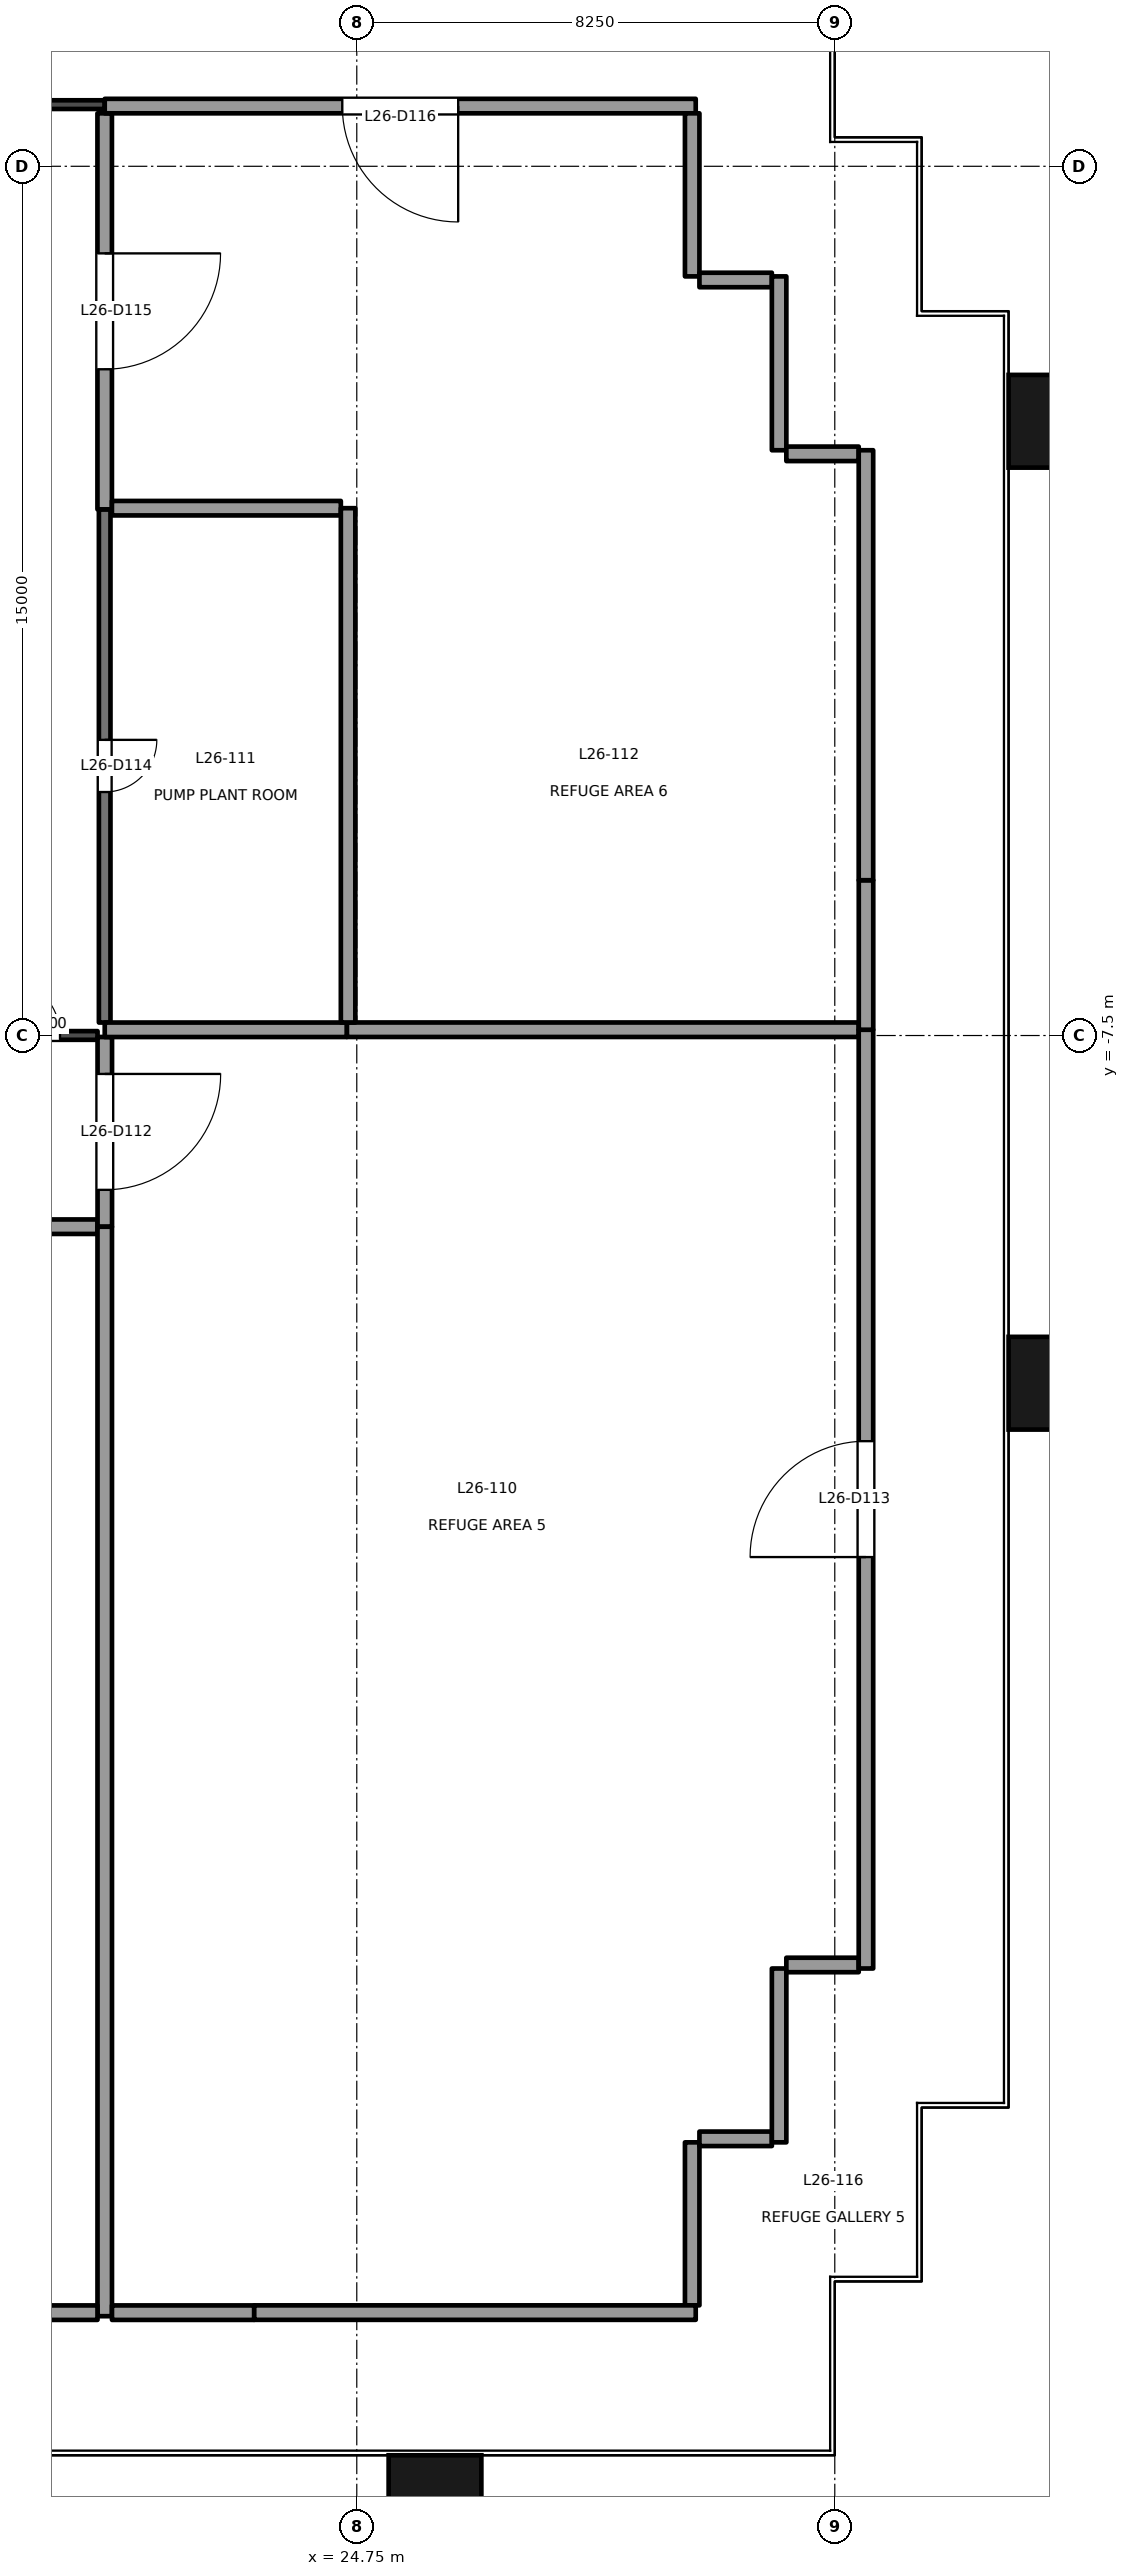
"""IFC4 building model, lengths in metres.
Left out: names, types, materials, properties, quantities, classifications, styles, units other than length and angle.
Written with IfcOpenShell. Run it as: python <this file> out.ifc"""

import sys

from ifc_helpers import new_model, si_unit, direction, frame, frame_2d, origin, origin_2d, place, context, subcontext, project, spatial, rectangle, extrude, element, fill, save


model = new_model("IFC4")
c1 = context("Model", 3, precision=1e-05, world=origin(), true_north=direction((0.0, 1.0)))
c2 = subcontext(c1, "Body", "Model", "MODEL_VIEW")
j1 = project(units=[si_unit("LENGTHUNIT", "METRE"), si_unit("PLANEANGLEUNIT", "RADIAN")], contexts=[c1])
p1 = place(None, origin())
s1 = spatial("IfcSite", under=j1, at=p1, CompositionType="ELEMENT")
p2 = place(p1, origin())
s2 = spatial("IfcBuilding", under=s1, at=p2, CompositionType="ELEMENT")
p3 = place(p2, frame((0.0, 0.0, 115.7)))
s3 = spatial("IfcBuildingStorey", under=s2, at=p3, CompositionType="ELEMENT", Elevation=115.7)
for number, where, z_axis, x_axis in (
    (1, (26.1, -32.9, -0.2), (0.0, 0.0, 1.0), (1.0, 0.0, 0.0)),
    (2, (36.9, -13.5, -0.2), (0.0, 0.0, 1.0), (0.0, 1.0, 0.0)),
    (3, (36.9, 3.1, -0.2), (0.0, 0.0, 1.0), (0.0, 1.0, 0.0)),
):
    element("IfcColumn", number, at=place(p3, frame(where, z_axis=z_axis, x_axis=x_axis)), inside=s3, PredefinedType="COLUMN", context=c2, shape_type="SweptSolid", body=[
        extrude(rectangle(XDim=1.6, YDim=1.8, at=origin_2d()), origin(), (0.0, 0.0, 1.0), 5.0),
    ])
p4 = place(p3, frame((17.98, -7.499, 0.0), z_axis=(0.0, 0.0, 1.0), x_axis=(1.0, 0.0, 0.0)))
e4 = element("IfcWall", 4, at=p4, inside=s3, PredefinedType="PARTITIONING", context=c2, shape_type="SweptSolid", body=[
    extrude(rectangle(XDim=2.296, YDim=0.15, at=frame_2d((1.148, 0.0))), origin(), (0.0, 0.0, 1.0), 2.35),
])
p5 = place(p4, frame((0.648, 0.0, 0.0)))
e5 = element("IfcOpeningElement", 5, at=p5, cuts=e4, PredefinedType="OPENING", context=c2, shape_type="SweptSolid", body=[
    extrude(rectangle(XDim=1.0, YDim=2.1, at=frame_2d((0.5, 1.05))), frame((0.0, 0.085, 0.0), z_axis=(0.0, -1.0, 0.0), x_axis=(1.0, 0.0, 0.0)), (0.0, 0.0, 1.0), 0.171),
])
p6 = place(p3, frame((20.275, -10.799, 0.0), z_axis=(0.0, 0.0, 1.0), x_axis=(-1.0, 0.0, 0.0)))
e6 = element("IfcWall", 6, at=p6, inside=s3, PredefinedType="PARTITIONING", context=c2, shape_type="SweptSolid", body=[
    extrude(rectangle(XDim=4.883, YDim=0.25, at=frame_2d((2.441, 0.0))), origin(), (0.0, 0.0, 1.0), 2.35),
])
p7 = place(p6, frame((1.441, 0.0, 0.0)))
e7 = element("IfcOpeningElement", 7, at=p7, cuts=e6, PredefinedType="OPENING", context=c2, shape_type="SweptSolid", body=[
    extrude(rectangle(XDim=2.0, YDim=2.1, at=frame_2d((1.0, 1.05))), frame((0.0, 0.135, 0.0), z_axis=(0.0, -1.0, 0.0), x_axis=(1.0, 0.0, 0.0)), (0.0, 0.0, 1.0), 0.271),
])
p8 = place(p3, frame((20.401, -7.526, 0.0), z_axis=(0.0, 0.0, 1.0), x_axis=(0.0, -1.0, 0.0)))
e8 = element("IfcWall", 8, at=p8, inside=s3, PredefinedType="PARTITIONING", context=c2, shape_type="SweptSolid", body=[
    extrude(rectangle(XDim=3.274, YDim=0.25, at=frame_2d((1.637, 0.0))), origin(), (0.0, 0.0, 1.0), 4.3),
])
p9 = place(p8, frame((0.637, 0.0, 0.0)))
e9 = element("IfcOpeningElement", 9, at=p9, cuts=e8, PredefinedType="OPENING", context=c2, shape_type="SweptSolid", body=[
    extrude(rectangle(XDim=2.0, YDim=2.1, at=frame_2d((1.0, 1.05))), frame((0.0, 0.135, 0.0), z_axis=(0.0, -1.0, 0.0), x_axis=(1.0, 0.0, 0.0)), (0.0, 0.0, 1.0), 0.271),
])
p10 = place(p3, frame((20.399, 1.58, 0.0), z_axis=(0.0, 0.0, 1.0), x_axis=(0.0, -1.0, 0.0)))
e10 = element("IfcWall", 10, at=p10, inside=s3, PredefinedType="PARTITIONING", context=c2, shape_type="SweptSolid", body=[
    extrude(rectangle(XDim=8.856, YDim=0.2, at=frame_2d((4.428, 0.0))), origin(), (0.0, 0.0, 1.0), 4.3),
])
p11 = place(p10, frame((3.978, 0.0, 0.0)))
e11 = element("IfcOpeningElement", 11, at=p11, cuts=e10, PredefinedType="OPENING", context=c2, shape_type="SweptSolid", body=[
    extrude(rectangle(XDim=0.9, YDim=2.1, at=frame_2d((0.45, 1.05))), frame((0.0, 0.111, 0.0), z_axis=(0.0, -1.0, 0.0), x_axis=(1.0, 0.0, 0.0)), (0.0, 0.0, 1.0), 0.221),
])
p12 = place(p3, frame((20.399, 8.414, 0.0), z_axis=(0.0, 0.0, 1.0), x_axis=(0.0, -1.0, 0.0)))
e12 = element("IfcWall", 12, at=p12, inside=s3, PredefinedType="PARTITIONING", context=c2, shape_type="SweptSolid", body=[
    extrude(rectangle(XDim=6.834, YDim=0.25, at=frame_2d((3.417, 0.0))), origin(), (0.0, 0.0, 1.0), 2.75),
])
p13 = place(p12, frame((2.417, 0.0, 0.0)))
e13 = element("IfcOpeningElement", 13, at=p13, cuts=e12, PredefinedType="OPENING", context=c2, shape_type="SweptSolid", body=[
    extrude(rectangle(XDim=2.0, YDim=2.1, at=frame_2d((1.0, 1.05))), frame((0.0, 0.135, 0.0), z_axis=(0.0, -1.0, 0.0), x_axis=(1.0, 0.0, 0.0)), (0.0, 0.0, 1.0), 0.271),
])
p14 = place(p3, frame((-20.3, 8.564, 0.0), z_axis=(0.0, 0.0, 1.0), x_axis=(1.0, 0.0, 0.0)))
e14 = element("IfcWall", 14, at=p14, inside=s3, PredefinedType="PARTITIONING", context=c2, shape_type="SweptSolid", body=[
    extrude(rectangle(XDim=40.7, YDim=0.15, at=frame_2d((20.35, 0.0))), origin(), (0.0, 0.0, 1.0), 2.75),
])
p15 = place(p3, frame((20.4, -10.8, 0.0), z_axis=(0.0, 0.0, 1.0), x_axis=(0.0, -1.0, 0.0)))
e15 = element("IfcWall", 15, at=p15, inside=s3, PredefinedType="PARTITIONING", context=c2, shape_type="SweptSolid", body=[
    extrude(rectangle(XDim=18.8, YDim=0.25, at=frame_2d((9.4, 0.0))), origin(), (0.0, 0.0, 1.0), 2.75),
])
p16 = place(p3, frame((9.537, -29.539, 0.0), z_axis=(0.0, 0.0, 1.0), x_axis=(1.0, 0.0, 0.0)))
e16 = element("IfcWall", 16, at=p16, inside=s3, PredefinedType="PARTITIONING", context=c2, shape_type="SweptSolid", body=[
    extrude(rectangle(XDim=10.738, YDim=0.25, at=frame_2d((5.369, 0.0))), origin(), (0.0, 0.0, 1.0), 2.35),
])
p17 = place(p16, frame((4.369, 0.0, 0.0)))
e17 = element("IfcOpeningElement", 17, at=p17, cuts=e16, PredefinedType="OPENING", context=c2, shape_type="SweptSolid", body=[
    extrude(rectangle(XDim=2.0, YDim=2.1, at=frame_2d((1.0, 1.05))), frame((0.0, 0.135, 0.0), z_axis=(0.0, -1.0, 0.0), x_axis=(1.0, 0.0, 0.0)), (0.0, 0.0, 1.0), 0.271),
])
p18 = place(p3, frame((20.4, -7.401, 0.0), z_axis=(0.0, 0.0, 1.0), x_axis=(1.0, 0.0, 0.0)))
e18 = element("IfcWall", 18, at=p18, inside=s3, PredefinedType="PARTITIONING", context=c2, shape_type="SweptSolid", body=[
    extrude(rectangle(XDim=4.18, YDim=0.25, at=frame_2d((2.09, 0.0))), origin(), (0.0, 0.0, 1.0), 4.8),
])
p19 = place(p3, frame((24.58, -7.4, 0.0), z_axis=(0.0, 0.0, 1.0), x_axis=(1.0, 0.0, 0.0)))
e19 = element("IfcWall", 19, at=p19, inside=s3, PredefinedType="PARTITIONING", context=c2, shape_type="SweptSolid", body=[
    extrude(rectangle(XDim=8.833, YDim=0.25, at=frame_2d((4.417, 0.0))), origin(), (0.0, 0.0, 1.0), 3.7),
])
p20 = place(p3, frame((22.98, -29.539, 0.0), z_axis=(0.0, 0.0, 1.0), x_axis=(-1.0, 0.0, 0.0)))
e20 = element("IfcWall", 20, at=p20, inside=s3, PredefinedType="PARTITIONING", context=c2, shape_type="SweptSolid", body=[
    extrude(rectangle(XDim=2.455, YDim=0.25, at=frame_2d((1.228, 0.0))), origin(), (0.0, 0.0, 1.0), 4.8),
])
p21 = place(p3, frame((30.539, -26.6, 0.0), z_axis=(0.0, 0.0, 1.0), x_axis=(0.0, -1.0, 0.0)))
e21 = element("IfcWall", 21, at=p21, inside=s3, PredefinedType="PARTITIONING", context=c2, shape_type="SweptSolid", body=[
    extrude(rectangle(XDim=2.813, YDim=0.25, at=frame_2d((1.406, 0.0))), origin(), (0.0, 0.0, 1.0), 4.8),
])
p22 = place(p3, frame((30.6, -29.538, 0.0), z_axis=(0.0, 0.0, 1.0), x_axis=(-1.0, 0.0, 0.0)))
e22 = element("IfcWall", 22, at=p22, inside=s3, PredefinedType="PARTITIONING", context=c2, shape_type="SweptSolid", body=[
    extrude(rectangle(XDim=7.62, YDim=0.25, at=frame_2d((3.81, 0.0))), origin(), (0.0, 0.0, 1.0), 4.8),
])
p23 = place(p3, frame((31.914, -26.539, 0.0), z_axis=(0.0, 0.0, 1.0), x_axis=(-1.0, 0.0, 0.0)))
e23 = element("IfcWall", 23, at=p23, inside=s3, PredefinedType="PARTITIONING", context=c2, shape_type="SweptSolid", body=[
    extrude(rectangle(XDim=1.25, YDim=0.25, at=frame_2d((0.625, 0.0))), origin(), (0.0, 0.0, 1.0), 4.8),
])
p24 = place(p3, frame((32.039, -23.6, 0.0), z_axis=(0.0, 0.0, 1.0), x_axis=(0.0, -1.0, 0.0)))
e24 = element("IfcWall", 24, at=p24, inside=s3, PredefinedType="PARTITIONING", context=c2, shape_type="SweptSolid", body=[
    extrude(rectangle(XDim=3.0, YDim=0.25, at=frame_2d((1.5, 0.0))), origin(), (0.0, 0.0, 1.0), 4.8),
])
p25 = place(p3, frame((33.413, -23.539, 0.0), z_axis=(0.0, 0.0, 1.0), x_axis=(-1.0, 0.0, 0.0)))
e25 = element("IfcWall", 25, at=p25, inside=s3, PredefinedType="PARTITIONING", context=c2, shape_type="SweptSolid", body=[
    extrude(rectangle(XDim=1.249, YDim=0.25, at=frame_2d((0.625, 0.0))), origin(), (0.0, 0.0, 1.0), 4.8),
])
p26 = place(p3, frame((33.538, -23.6, 0.0), z_axis=(0.0, 0.0, 1.0), x_axis=(0.0, 1.0, 0.0)))
e26 = element("IfcWall", 26, at=p26, inside=s3, PredefinedType="PARTITIONING", context=c2, shape_type="SweptSolid", body=[
    extrude(rectangle(XDim=16.2, YDim=0.25, at=frame_2d((8.1, 0.0))), origin(), (0.0, 0.0, 1.0), 2.75),
])
p27 = place(p26, frame((7.1, 0.0, 0.0)))
e27 = element("IfcOpeningElement", 27, at=p27, cuts=e26, PredefinedType="OPENING", context=c2, shape_type="SweptSolid", body=[
    extrude(rectangle(XDim=2.0, YDim=2.1, at=frame_2d((1.0, 1.05))), frame((0.0, 0.135, 0.0), z_axis=(0.0, -1.0, 0.0), x_axis=(1.0, 0.0, 0.0)), (0.0, 0.0, 1.0), 0.271),
])
p28 = place(p3, frame((20.524, 1.6, 0.0), z_axis=(0.0, 0.0, 1.0), x_axis=(1.0, 0.0, 0.0)))
e28 = element("IfcWall", 28, at=p28, inside=s3, PredefinedType="PARTITIONING", context=c2, shape_type="SweptSolid", body=[
    extrude(rectangle(XDim=3.951, YDim=0.25, at=frame_2d((1.976, 0.0))), origin(), (0.0, 0.0, 1.0), 4.8),
])
p29 = place(p3, frame((24.6, 1.6, 0.0), z_axis=(0.0, 0.0, 1.0), x_axis=(0.0, -1.0, 0.0)))
e29 = element("IfcWall", 29, at=p29, inside=s3, PredefinedType="PARTITIONING", context=c2, shape_type="SweptSolid", body=[
    extrude(rectangle(XDim=8.875, YDim=0.25, at=frame_2d((4.438, 0.0))), origin(), (0.0, 0.0, 1.0), 4.3),
])
p30 = place(p3, frame((33.539, -4.82, 0.0), z_axis=(0.0, 0.0, 1.0), x_axis=(0.0, -1.0, 0.0)))
e30 = element("IfcWall", 30, at=p30, inside=s3, PredefinedType="PARTITIONING", context=c2, shape_type="SweptSolid", body=[
    extrude(rectangle(XDim=2.58, YDim=0.25, at=frame_2d((1.29, 0.0))), origin(), (0.0, 0.0, 1.0), 4.8),
])
p31 = place(p3, frame((30.6, 8.539, 0.0), z_axis=(0.0, 0.0, 1.0), x_axis=(-1.0, 0.0, 0.0)))
e31 = element("IfcWall", 31, at=p31, inside=s3, PredefinedType="PARTITIONING", context=c2, shape_type="SweptSolid", body=[
    extrude(rectangle(XDim=10.2, YDim=0.25, at=frame_2d((5.1, 0.0))), origin(), (0.0, 0.0, 1.0), 4.8),
])
p32 = place(p31, frame((4.1, 0.0, 0.0)))
e32 = element("IfcOpeningElement", 32, at=p32, cuts=e31, PredefinedType="OPENING", context=c2, shape_type="SweptSolid", body=[
    extrude(rectangle(XDim=2.0, YDim=2.1, at=frame_2d((1.0, 1.05))), frame((0.0, 0.135, 0.0), z_axis=(0.0, -1.0, 0.0), x_axis=(1.0, 0.0, 0.0)), (0.0, 0.0, 1.0), 0.271),
])
p33 = place(p3, frame((30.539, 8.414, 0.0), z_axis=(0.0, 0.0, 1.0), x_axis=(0.0, -1.0, 0.0)))
e33 = element("IfcWall", 33, at=p33, inside=s3, PredefinedType="PARTITIONING", context=c2, shape_type="SweptSolid", body=[
    extrude(rectangle(XDim=2.814, YDim=0.25, at=frame_2d((1.407, 0.0))), origin(), (0.0, 0.0, 1.0), 4.8),
])
p34 = place(p3, frame((30.664, 5.538, 0.0), z_axis=(0.0, 0.0, 1.0), x_axis=(1.0, 0.0, 0.0)))
e34 = element("IfcWall", 34, at=p34, inside=s3, PredefinedType="PARTITIONING", context=c2, shape_type="SweptSolid", body=[
    extrude(rectangle(XDim=1.25, YDim=0.25, at=frame_2d((0.625, 0.0))), origin(), (0.0, 0.0, 1.0), 4.8),
])
p35 = place(p3, frame((32.039, 5.6, 0.0), z_axis=(0.0, 0.0, 1.0), x_axis=(0.0, -1.0, 0.0)))
e35 = element("IfcWall", 35, at=p35, inside=s3, PredefinedType="PARTITIONING", context=c2, shape_type="SweptSolid", body=[
    extrude(rectangle(XDim=3.0, YDim=0.25, at=frame_2d((1.5, 0.0))), origin(), (0.0, 0.0, 1.0), 2.75),
])
p36 = place(p3, frame((32.164, 2.538, 0.0), z_axis=(0.0, 0.0, 1.0), x_axis=(1.0, 0.0, 0.0)))
e36 = element("IfcWall", 36, at=p36, inside=s3, PredefinedType="PARTITIONING", context=c2, shape_type="SweptSolid", body=[
    extrude(rectangle(XDim=1.249, YDim=0.25, at=frame_2d((0.625, 0.0))), origin(), (0.0, 0.0, 1.0), 4.8),
])
p37 = place(p3, frame((33.538, 2.6, 0.0), z_axis=(0.0, 0.0, 1.0), x_axis=(0.0, -1.0, 0.0)))
e37 = element("IfcWall", 37, at=p37, inside=s3, PredefinedType="PARTITIONING", context=c2, shape_type="SweptSolid", body=[
    extrude(rectangle(XDim=7.42, YDim=0.25, at=frame_2d((3.71, 0.0))), origin(), (0.0, 0.0, 1.0), 4.8),
])
p38 = place(p5, origin())
e38 = element("IfcDoor", 38, at=p38, inside=s3, OperationType="SINGLE_SWING_LEFT", PredefinedType="DOOR", context=c2, shape_type="SweptSolid", body=[
    extrude(rectangle(XDim=1.0, YDim=2.1, at=frame_2d((0.5, 1.05))), frame((0.0, 0.025, 0.0), z_axis=(0.0, -1.0, 0.0), x_axis=(1.0, 0.0, 0.0)), (0.0, 0.0, 1.0), 0.05),
])
fill(e5, e38)
p39 = place(p9, origin())
e39 = element("IfcDoor", 39, at=p39, inside=s3, OperationType="DOUBLE_DOOR_SINGLE_SWING", PredefinedType="DOOR", context=c2, shape_type="SweptSolid", body=[
    extrude(rectangle(XDim=2.0, YDim=2.1, at=frame_2d((1.0, 1.05))), frame((0.0, 0.025, 0.0), z_axis=(0.0, -1.0, 0.0), x_axis=(1.0, 0.0, 0.0)), (0.0, 0.0, 1.0), 0.05),
])
fill(e9, e39)
p40 = place(p27, origin())
e40 = element("IfcDoor", 40, at=p40, inside=s3, OperationType="DOUBLE_DOOR_SINGLE_SWING", PredefinedType="DOOR", context=c2, shape_type="SweptSolid", body=[
    extrude(rectangle(XDim=2.0, YDim=2.1, at=frame_2d((1.0, 1.05))), frame((0.0, 0.025, 0.0), z_axis=(0.0, -1.0, 0.0), x_axis=(1.0, 0.0, 0.0)), (0.0, 0.0, 1.0), 0.05),
])
fill(e27, e40)
p41 = place(p11, origin())
e41 = element("IfcDoor", 41, at=p41, inside=s3, OperationType="SINGLE_SWING_LEFT", PredefinedType="DOOR", context=c2, shape_type="SweptSolid", body=[
    extrude(rectangle(XDim=0.9, YDim=2.1, at=frame_2d((0.45, 1.05))), frame((0.0, 0.025, 0.0), z_axis=(0.0, -1.0, 0.0), x_axis=(1.0, 0.0, 0.0)), (0.0, 0.0, 1.0), 0.05),
])
fill(e11, e41)
p42 = place(p13, origin())
e42 = element("IfcDoor", 42, at=p42, inside=s3, OperationType="DOUBLE_DOOR_SINGLE_SWING", PredefinedType="DOOR", context=c2, shape_type="SweptSolid", body=[
    extrude(rectangle(XDim=2.0, YDim=2.1, at=frame_2d((1.0, 1.05))), frame((0.0, 0.025, 0.0), z_axis=(0.0, -1.0, 0.0), x_axis=(1.0, 0.0, 0.0)), (0.0, 0.0, 1.0), 0.05),
])
fill(e13, e42)
p43 = place(p32, origin())
e43 = element("IfcDoor", 43, at=p43, inside=s3, OperationType="DOUBLE_DOOR_SINGLE_SWING", PredefinedType="DOOR", context=c2, shape_type="SweptSolid", body=[
    extrude(rectangle(XDim=2.0, YDim=2.1, at=frame_2d((1.0, 1.05))), frame((0.0, 0.025, 0.0), z_axis=(0.0, -1.0, 0.0), x_axis=(1.0, 0.0, 0.0)), (0.0, 0.0, 1.0), 0.05),
])
fill(e32, e43)
save(model, sys.argv[1])
